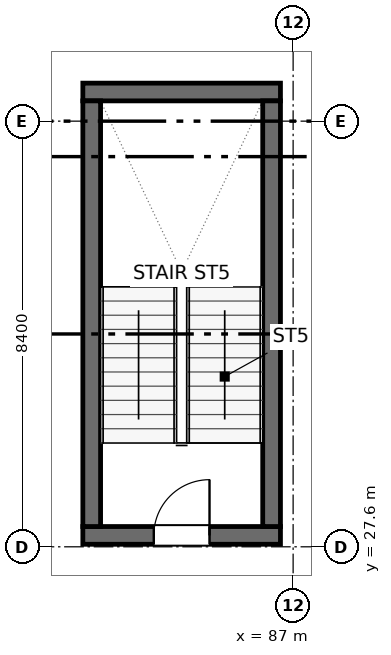
"""IFC4 building model, lengths in metres.
Left out: names, types, materials, properties, quantities, classifications, styles, units other than length and angle.
Written with IfcOpenShell. Run it as: python <this file> out.ifc"""

import sys

from ifc_helpers import new_model, si_unit, direction, frame, frame_2d, origin, place, context, subcontext, project, spatial, rectangle, extrude, element, fill, save


model = new_model("IFC4")
c1 = context("Model", 3, precision=1e-05, world=origin(), true_north=direction((0.0, 1.0)))
c2 = subcontext(c1, "Body", "Model", "MODEL_VIEW")
j1 = project(units=[si_unit("LENGTHUNIT", "METRE"), si_unit("PLANEANGLEUNIT", "RADIAN")], contexts=[c1])
p1 = place(None, origin())
s1 = spatial("IfcSite", under=j1, at=p1, CompositionType="ELEMENT")
p2 = place(p1, origin())
s2 = spatial("IfcBuilding", under=s1, at=p2, CompositionType="ELEMENT")
p3 = place(p2, frame((0.0, 0.0, 8.7)))
s3 = spatial("IfcBuildingStorey", under=s2, at=p3, CompositionType="ELEMENT", Elevation=8.7)
p4 = place(p3, frame((82.85, 27.825, 0.0), z_axis=(0.0, 0.0, 1.0), x_axis=(1.0, 0.0, 0.0)))
e1 = element("IfcWall", 1, at=p4, inside=s3, PredefinedType="SHEAR", context=c2, shape_type="SweptSolid", body=[
    extrude(rectangle(XDim=3.9, YDim=0.35, at=frame_2d((1.95, 0.0))), origin(), (0.0, 0.0, 1.0), 4.2),
])
p5 = place(p4, frame((1.4, 0.0, 0.0)))
e2 = element("IfcOpeningElement", 2, at=p5, cuts=e1, PredefinedType="OPENING", context=c2, shape_type="SweptSolid", body=[
    extrude(rectangle(XDim=1.1, YDim=2.05, at=frame_2d((0.55, 1.025))), frame((0.0, 0.185, 0.0), z_axis=(0.0, -1.0, 0.0), x_axis=(1.0, 0.0, 0.0)), (0.0, 0.0, 1.0), 0.37),
])
p6 = place(p3, frame((82.85, 36.575, 0.0), z_axis=(0.0, 0.0, 1.0), x_axis=(1.0, 0.0, 0.0)))
e3 = element("IfcWall", 3, at=p6, inside=s3, PredefinedType="SHEAR", context=c2, shape_type="SweptSolid", body=[
    extrude(rectangle(XDim=3.9, YDim=0.35, at=frame_2d((1.95, 0.0))), origin(), (0.0, 0.0, 1.0), 4.2),
])
for number, where, z_axis, x_axis in (
    (4, (83.025, 28.0, 0.0), (0.0, 0.0, 1.0), (0.0, 1.0, 0.0)),
    (5, (86.575, 28.0, 0.0), (0.0, 0.0, 1.0), (0.0, 1.0, 0.0)),
):
    element("IfcWall", number, at=place(p3, frame(where, z_axis=z_axis, x_axis=x_axis)), inside=s3, PredefinedType="SHEAR", context=c2, shape_type="SweptSolid", body=[
        extrude(rectangle(XDim=8.4, YDim=0.35, at=frame_2d((4.2, 0.0))), origin(), (0.0, 0.0, 1.0), 4.2),
    ])
p7 = place(p5, origin())
e6 = element("IfcDoor", 6, at=p7, inside=s3, OperationType="SINGLE_SWING_RIGHT", PredefinedType="DOOR", context=c2, shape_type="SweptSolid", body=[
    extrude(rectangle(XDim=1.1, YDim=2.05, at=frame_2d((0.55, 1.025))), frame((0.0, 0.025, 0.0), z_axis=(0.0, -1.0, 0.0), x_axis=(1.0, 0.0, 0.0)), (0.0, 0.0, 1.0), 0.05),
])
fill(e2, e6)
save(model, sys.argv[1])
